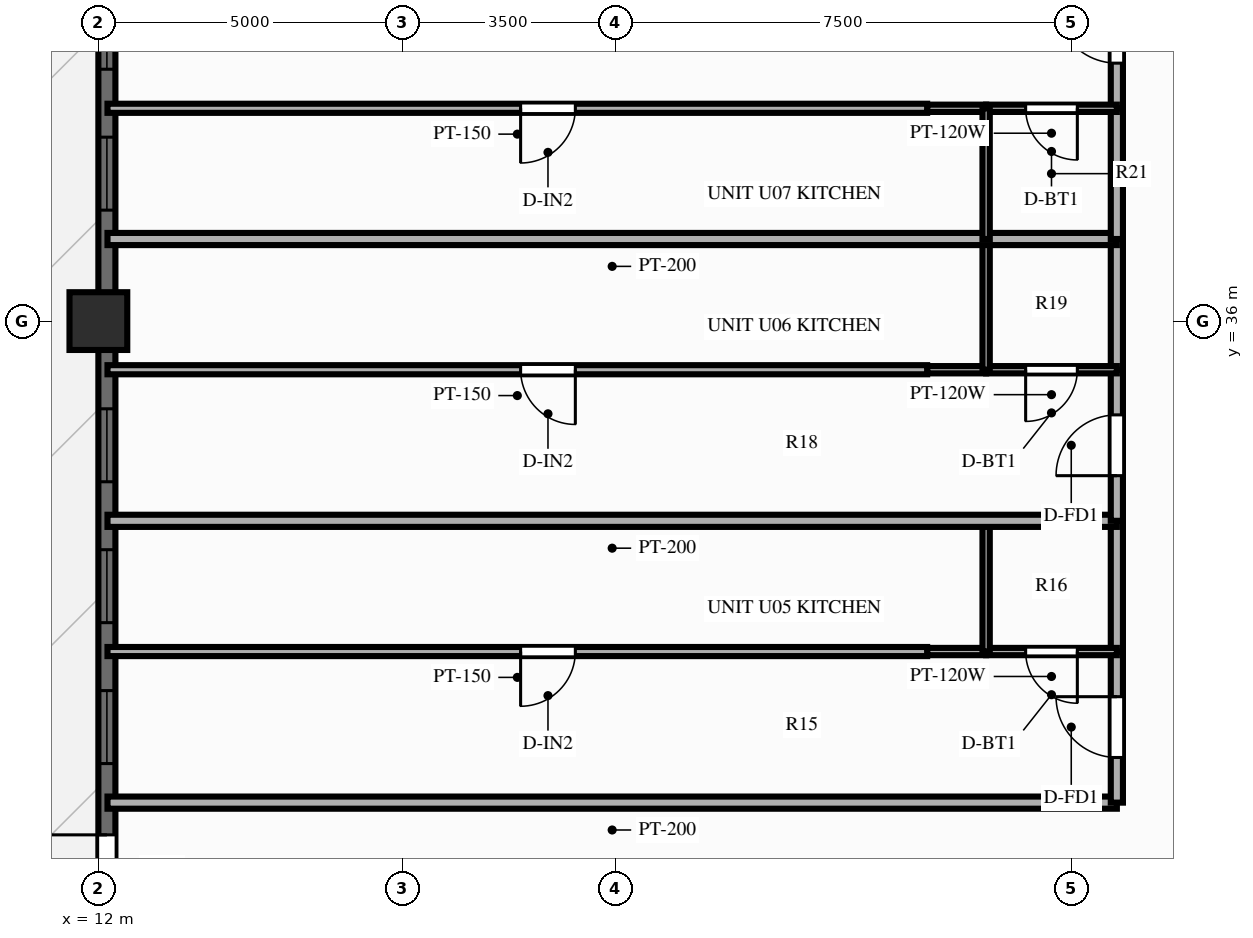
"""IFC4 building model, lengths in metres.
Left out: names, types, materials, properties, quantities, classifications, styles, units other than length and angle.
Written with IfcOpenShell. Run it as: python <this file> out.ifc"""

import sys

from ifc_helpers import new_model, si_unit, direction, frame, frame_2d, origin, origin_2d, place, context, subcontext, project, spatial, rectangle, extrude, source, transform, mapped, element, fill, save


model = new_model("IFC4")
c1 = context("Model", 3, precision=1e-05, world=origin(), true_north=direction((0.0, 1.0)))
c2 = subcontext(c1, "Body", "Model", "MODEL_VIEW")
j1 = project(units=[si_unit("LENGTHUNIT", "METRE"), si_unit("PLANEANGLEUNIT", "RADIAN")], contexts=[c1])
p1 = place(None, origin())
s1 = spatial("IfcSite", under=j1, at=p1, CompositionType="ELEMENT")
p2 = place(p1, origin())
s2 = spatial("IfcBuilding", under=s1, at=p2, CompositionType="ELEMENT")
p3 = place(p2, frame((0.0, 0.0, 122.85)))
s3 = spatial("IfcBuildingStorey", under=s2, at=p3, CompositionType="ELEMENT", Elevation=122.85)
m1 = source(origin(), c2, "Body", "SweptSolid", [
    extrude(rectangle(XDim=0.95, YDim=0.95, at=origin_2d()), origin(), (0.0, 0.0, 1.0), 3.9),
])
p4 = place(p3, frame((12.0, 36.0, 0.0), z_axis=(0.0, 0.0, 1.0), x_axis=(1.0, 0.0, 0.0)))
e1 = element("IfcColumn", 1, at=p4, inside=s3, PredefinedType="COLUMN", context=c2, shape_type="MappedRepresentation", body=[
    mapped(m1, transform((0.0, 0.0, 0.0), scale=1.0)),
])
p5 = place(p3, frame((12.14, 7.2, 0.0), z_axis=(0.0, 0.0, 1.0), x_axis=(0.0, 1.0, 0.0)))
e2 = element("IfcWall", 2, at=p5, inside=s3, PredefinedType="SOLIDWALL", context=c2, shape_type="SweptSolid", body=[
    extrude(rectangle(XDim=39.6, YDim=0.28, at=frame_2d((19.8, 0.0))), origin(), (0.0, 0.0, 1.0), 2.24),
])
p6 = place(p5, frame((0.89, 0.0, 0.25)))
e3 = element("IfcOpeningElement", 3, at=p6, cuts=e2, PredefinedType="OPENING", context=c2, shape_type="SweptSolid", body=[
    extrude(rectangle(XDim=1.2, YDim=1.5, at=frame_2d((0.6, 0.75))), frame((0.0, 0.152, 0.0), z_axis=(0.0, -1.0, 0.0), x_axis=(1.0, 0.0, 0.0)), (0.0, 0.0, 1.0), 0.304),
])
p7 = place(p5, frame((3.14, 0.0, 0.25)))
e4 = element("IfcOpeningElement", 4, at=p7, cuts=e2, PredefinedType="OPENING", context=c2, shape_type="SweptSolid", body=[
    extrude(rectangle(XDim=1.2, YDim=1.5, at=frame_2d((0.6, 0.75))), frame((0.0, 0.152, 0.0), z_axis=(0.0, -1.0, 0.0), x_axis=(1.0, 0.0, 0.0)), (0.0, 0.0, 1.0), 0.304),
])
p8 = place(p5, frame((5.458, 0.0, 0.25)))
e5 = element("IfcOpeningElement", 5, at=p8, cuts=e2, PredefinedType="OPENING", context=c2, shape_type="SweptSolid", body=[
    extrude(rectangle(XDim=1.2, YDim=1.5, at=frame_2d((0.6, 0.75))), frame((0.0, 0.152, 0.0), z_axis=(0.0, -1.0, 0.0), x_axis=(1.0, 0.0, 0.0)), (0.0, 0.0, 1.0), 0.304),
])
p9 = place(p5, frame((7.775, 0.0, 0.25)))
e6 = element("IfcOpeningElement", 6, at=p9, cuts=e2, PredefinedType="OPENING", context=c2, shape_type="SweptSolid", body=[
    extrude(rectangle(XDim=1.2, YDim=1.5, at=frame_2d((0.6, 0.75))), frame((0.0, 0.152, 0.0), z_axis=(0.0, -1.0, 0.0), x_axis=(1.0, 0.0, 0.0)), (0.0, 0.0, 1.0), 0.304),
])
p10 = place(p5, frame((12.242, 0.0, 0.25)))
e7 = element("IfcOpeningElement", 7, at=p10, cuts=e2, PredefinedType="OPENING", context=c2, shape_type="SweptSolid", body=[
    extrude(rectangle(XDim=1.2, YDim=1.5, at=frame_2d((0.6, 0.75))), frame((0.0, 0.152, 0.0), z_axis=(0.0, -1.0, 0.0), x_axis=(1.0, 0.0, 0.0)), (0.0, 0.0, 1.0), 0.304),
])
p11 = place(p5, frame((14.56, 0.0, 0.25)))
e8 = element("IfcOpeningElement", 8, at=p11, cuts=e2, PredefinedType="OPENING", context=c2, shape_type="SweptSolid", body=[
    extrude(rectangle(XDim=1.2, YDim=1.5, at=frame_2d((0.6, 0.75))), frame((0.0, 0.152, 0.0), z_axis=(0.0, -1.0, 0.0), x_axis=(1.0, 0.0, 0.0)), (0.0, 0.0, 1.0), 0.304),
])
p12 = place(p5, frame((16.877, 0.0, 0.25)))
e9 = element("IfcOpeningElement", 9, at=p12, cuts=e2, PredefinedType="OPENING", context=c2, shape_type="SweptSolid", body=[
    extrude(rectangle(XDim=1.2, YDim=1.5, at=frame_2d((0.6, 0.75))), frame((0.0, 0.152, 0.0), z_axis=(0.0, -1.0, 0.0), x_axis=(1.0, 0.0, 0.0)), (0.0, 0.0, 1.0), 0.304),
])
p13 = place(p5, frame((19.25, 0.0, 0.0)))
e10 = element("IfcOpeningElement", 10, at=p13, cuts=e2, PredefinedType="OPENING", context=c2, shape_type="SweptSolid", body=[
    extrude(rectangle(XDim=1.1, YDim=2.15, at=frame_2d((0.55, 1.075))), frame((0.0, 0.152, 0.0), z_axis=(0.0, -1.0, 0.0), x_axis=(1.0, 0.0, 0.0)), (0.0, 0.0, 1.0), 0.304),
])
p14 = place(p5, frame((21.522, 0.0, 0.25)))
e11 = element("IfcOpeningElement", 11, at=p14, cuts=e2, PredefinedType="OPENING", context=c2, shape_type="SweptSolid", body=[
    extrude(rectangle(XDim=1.2, YDim=1.5, at=frame_2d((0.6, 0.75))), frame((0.0, 0.152, 0.0), z_axis=(0.0, -1.0, 0.0), x_axis=(1.0, 0.0, 0.0)), (0.0, 0.0, 1.0), 0.304),
])
p15 = place(p5, frame((23.84, 0.0, 0.25)))
e12 = element("IfcOpeningElement", 12, at=p15, cuts=e2, PredefinedType="OPENING", context=c2, shape_type="SweptSolid", body=[
    extrude(rectangle(XDim=1.2, YDim=1.5, at=frame_2d((0.6, 0.75))), frame((0.0, 0.152, 0.0), z_axis=(0.0, -1.0, 0.0), x_axis=(1.0, 0.0, 0.0)), (0.0, 0.0, 1.0), 0.304),
])
p16 = place(p5, frame((26.157, 0.0, 0.25)))
e13 = element("IfcOpeningElement", 13, at=p16, cuts=e2, PredefinedType="OPENING", context=c2, shape_type="SweptSolid", body=[
    extrude(rectangle(XDim=1.2, YDim=1.5, at=frame_2d((0.6, 0.75))), frame((0.0, 0.152, 0.0), z_axis=(0.0, -1.0, 0.0), x_axis=(1.0, 0.0, 0.0)), (0.0, 0.0, 1.0), 0.304),
])
p17 = place(p5, frame((30.625, 0.0, 0.25)))
e14 = element("IfcOpeningElement", 14, at=p17, cuts=e2, PredefinedType="OPENING", context=c2, shape_type="SweptSolid", body=[
    extrude(rectangle(XDim=1.2, YDim=1.5, at=frame_2d((0.6, 0.75))), frame((0.0, 0.152, 0.0), z_axis=(0.0, -1.0, 0.0), x_axis=(1.0, 0.0, 0.0)), (0.0, 0.0, 1.0), 0.304),
])
p18 = place(p5, frame((32.942, 0.0, 0.25)))
e15 = element("IfcOpeningElement", 15, at=p18, cuts=e2, PredefinedType="OPENING", context=c2, shape_type="SweptSolid", body=[
    extrude(rectangle(XDim=1.2, YDim=1.5, at=frame_2d((0.6, 0.75))), frame((0.0, 0.152, 0.0), z_axis=(0.0, -1.0, 0.0), x_axis=(1.0, 0.0, 0.0)), (0.0, 0.0, 1.0), 0.304),
])
p19 = place(p5, frame((35.26, 0.0, 0.25)))
e16 = element("IfcOpeningElement", 16, at=p19, cuts=e2, PredefinedType="OPENING", context=c2, shape_type="SweptSolid", body=[
    extrude(rectangle(XDim=1.2, YDim=1.5, at=frame_2d((0.6, 0.75))), frame((0.0, 0.152, 0.0), z_axis=(0.0, -1.0, 0.0), x_axis=(1.0, 0.0, 0.0)), (0.0, 0.0, 1.0), 0.304),
])
p20 = place(p5, frame((37.51, 0.0, 0.25)))
e17 = element("IfcOpeningElement", 17, at=p20, cuts=e2, PredefinedType="OPENING", context=c2, shape_type="SweptSolid", body=[
    extrude(rectangle(XDim=1.2, YDim=1.5, at=frame_2d((0.6, 0.75))), frame((0.0, 0.152, 0.0), z_axis=(0.0, -1.0, 0.0), x_axis=(1.0, 0.0, 0.0)), (0.0, 0.0, 1.0), 0.304),
])
p21 = place(p3, frame((28.75, 28.08, 0.0), z_axis=(0.0, 0.0, 1.0), x_axis=(-1.0, 0.0, 0.0)))
e18 = element("IfcWall", 18, at=p21, inside=s3, PredefinedType="PARTITIONING", context=c2, shape_type="SweptSolid", body=[
    extrude(rectangle(XDim=16.6, YDim=0.2, at=frame_2d((8.3, 0.0))), origin(), (0.0, 0.0, 1.0), 3.56),
])
p22 = place(p3, frame((28.75, 28.08, 0.0), z_axis=(0.0, 0.0, 1.0), x_axis=(0.0, 1.0, 0.0)))
e19 = element("IfcWall", 19, at=p22, inside=s3, PredefinedType="PARTITIONING", context=c2, shape_type="SweptSolid", body=[
    extrude(rectangle(XDim=2.485, YDim=0.2, at=frame_2d((1.242, 0.0))), origin(), (0.0, 0.0, 1.0), 3.56),
])
p23 = place(p22, frame((0.742, 0.0, 0.0)))
e20 = element("IfcOpeningElement", 20, at=p23, cuts=e19, PredefinedType="OPENING", context=c2, shape_type="SweptSolid", body=[
    extrude(rectangle(XDim=1.0, YDim=2.15, at=frame_2d((0.5, 1.075))), frame((0.0, 0.112, 0.0), z_axis=(0.0, -1.0, 0.0), x_axis=(1.0, 0.0, 0.0)), (0.0, 0.0, 1.0), 0.224),
])
p24 = place(p3, frame((28.75, 30.565, 0.0), z_axis=(0.0, 0.0, 1.0), x_axis=(0.0, 1.0, 0.0)))
e21 = element("IfcWall", 21, at=p24, inside=s3, PredefinedType="PARTITIONING", context=c2, shape_type="SweptSolid", body=[
    extrude(rectangle(XDim=2.15, YDim=0.2, at=frame_2d((1.075, 0.0))), origin(), (0.0, 0.0, 1.0), 3.56),
])
p25 = place(p3, frame((28.75, 30.565, 0.0), z_axis=(0.0, 0.0, 1.0), x_axis=(-1.0, 0.0, 0.0)))
e22 = element("IfcWall", 22, at=p25, inside=s3, PredefinedType="PARTITIONING", context=c2, shape_type="SweptSolid", body=[
    extrude(rectangle(XDim=2.15, YDim=0.12, at=frame_2d((1.075, 0.0))), origin(), (0.0, 0.0, 1.0), 3.56),
])
p26 = place(p25, frame((0.65, 0.0, 0.0)))
e23 = element("IfcOpeningElement", 23, at=p26, cuts=e22, PredefinedType="OPENING", context=c2, shape_type="SweptSolid", body=[
    extrude(rectangle(XDim=0.85, YDim=2.05, at=frame_2d((0.425, 1.025))), frame((0.0, 0.072, 0.0), z_axis=(0.0, -1.0, 0.0), x_axis=(1.0, 0.0, 0.0)), (0.0, 0.0, 1.0), 0.144),
])
p27 = place(p3, frame((26.6, 30.565, 0.0), z_axis=(0.0, 0.0, 1.0), x_axis=(-1.0, 0.0, 0.0)))
e24 = element("IfcWall", 24, at=p27, inside=s3, PredefinedType="PARTITIONING", context=c2, shape_type="SweptSolid", body=[
    extrude(rectangle(XDim=0.97, YDim=0.12, at=frame_2d((0.485, 0.0))), origin(), (0.0, 0.0, 1.0), 3.56),
])
p28 = place(p3, frame((26.6, 30.565, 0.0), z_axis=(0.0, 0.0, 1.0), x_axis=(0.0, 1.0, 0.0)))
e25 = element("IfcWall", 25, at=p28, inside=s3, PredefinedType="PARTITIONING", context=c2, shape_type="SweptSolid", body=[
    extrude(rectangle(XDim=2.15, YDim=0.12, at=frame_2d((1.075, 0.0))), origin(), (0.0, 0.0, 1.0), 3.56),
])
p29 = place(p3, frame((25.63, 30.565, 0.0), z_axis=(0.0, 0.0, 1.0), x_axis=(-1.0, 0.0, 0.0)))
e26 = element("IfcWall", 26, at=p29, inside=s3, PredefinedType="PARTITIONING", context=c2, shape_type="SweptSolid", body=[
    extrude(rectangle(XDim=13.48, YDim=0.15, at=frame_2d((6.74, 0.0))), origin(), (0.0, 0.0, 1.0), 3.56),
])
p30 = place(p29, frame((5.786, 0.0, 0.0)))
e27 = element("IfcOpeningElement", 27, at=p30, cuts=e26, PredefinedType="OPENING", context=c2, shape_type="SweptSolid", body=[
    extrude(rectangle(XDim=0.9, YDim=2.1, at=frame_2d((0.45, 1.05))), frame((0.0, 0.087, 0.0), z_axis=(0.0, -1.0, 0.0), x_axis=(1.0, 0.0, 0.0)), (0.0, 0.0, 1.0), 0.174),
])
p31 = place(p3, frame((28.75, 32.715, 0.0), z_axis=(0.0, 0.0, 1.0), x_axis=(-1.0, 0.0, 0.0)))
e28 = element("IfcWall", 28, at=p31, inside=s3, PredefinedType="PARTITIONING", context=c2, shape_type="SweptSolid", body=[
    extrude(rectangle(XDim=16.6, YDim=0.2, at=frame_2d((8.3, 0.0))), origin(), (0.0, 0.0, 1.0), 3.56),
])
p32 = place(p3, frame((28.75, 32.715, 0.0), z_axis=(0.0, 0.0, 1.0), x_axis=(0.0, 1.0, 0.0)))
e29 = element("IfcWall", 29, at=p32, inside=s3, PredefinedType="PARTITIONING", context=c2, shape_type="SweptSolid", body=[
    extrude(rectangle(XDim=2.485, YDim=0.2, at=frame_2d((1.242, 0.0))), origin(), (0.0, 0.0, 1.0), 3.56),
])
p33 = place(p32, frame((0.742, 0.0, 0.0)))
e30 = element("IfcOpeningElement", 30, at=p33, cuts=e29, PredefinedType="OPENING", context=c2, shape_type="SweptSolid", body=[
    extrude(rectangle(XDim=1.0, YDim=2.15, at=frame_2d((0.5, 1.075))), frame((0.0, 0.112, 0.0), z_axis=(0.0, -1.0, 0.0), x_axis=(1.0, 0.0, 0.0)), (0.0, 0.0, 1.0), 0.224),
])
p34 = place(p3, frame((28.75, 35.2, 0.0), z_axis=(0.0, 0.0, 1.0), x_axis=(0.0, 1.0, 0.0)))
e31 = element("IfcWall", 31, at=p34, inside=s3, PredefinedType="PARTITIONING", context=c2, shape_type="SweptSolid", body=[
    extrude(rectangle(XDim=2.15, YDim=0.2, at=frame_2d((1.075, 0.0))), origin(), (0.0, 0.0, 1.0), 3.56),
])
p35 = place(p3, frame((28.75, 35.2, 0.0), z_axis=(0.0, 0.0, 1.0), x_axis=(-1.0, 0.0, 0.0)))
e32 = element("IfcWall", 32, at=p35, inside=s3, PredefinedType="PARTITIONING", context=c2, shape_type="SweptSolid", body=[
    extrude(rectangle(XDim=2.15, YDim=0.12, at=frame_2d((1.075, 0.0))), origin(), (0.0, 0.0, 1.0), 3.56),
])
p36 = place(p35, frame((0.65, 0.0, 0.0)))
e33 = element("IfcOpeningElement", 33, at=p36, cuts=e32, PredefinedType="OPENING", context=c2, shape_type="SweptSolid", body=[
    extrude(rectangle(XDim=0.85, YDim=2.05, at=frame_2d((0.425, 1.025))), frame((0.0, 0.072, 0.0), z_axis=(0.0, -1.0, 0.0), x_axis=(1.0, 0.0, 0.0)), (0.0, 0.0, 1.0), 0.144),
])
p37 = place(p3, frame((26.6, 35.2, 0.0), z_axis=(0.0, 0.0, 1.0), x_axis=(-1.0, 0.0, 0.0)))
e34 = element("IfcWall", 34, at=p37, inside=s3, PredefinedType="PARTITIONING", context=c2, shape_type="SweptSolid", body=[
    extrude(rectangle(XDim=0.97, YDim=0.12, at=frame_2d((0.485, 0.0))), origin(), (0.0, 0.0, 1.0), 3.56),
])
p38 = place(p3, frame((26.6, 35.2, 0.0), z_axis=(0.0, 0.0, 1.0), x_axis=(0.0, 1.0, 0.0)))
e35 = element("IfcWall", 35, at=p38, inside=s3, PredefinedType="PARTITIONING", context=c2, shape_type="SweptSolid", body=[
    extrude(rectangle(XDim=2.15, YDim=0.12, at=frame_2d((1.075, 0.0))), origin(), (0.0, 0.0, 1.0), 3.56),
])
p39 = place(p3, frame((25.63, 35.2, 0.0), z_axis=(0.0, 0.0, 1.0), x_axis=(-1.0, 0.0, 0.0)))
e36 = element("IfcWall", 36, at=p39, inside=s3, PredefinedType="PARTITIONING", context=c2, shape_type="SweptSolid", body=[
    extrude(rectangle(XDim=13.48, YDim=0.15, at=frame_2d((6.74, 0.0))), origin(), (0.0, 0.0, 1.0), 3.56),
])
p40 = place(p39, frame((5.786, 0.0, 0.0)))
e37 = element("IfcOpeningElement", 37, at=p40, cuts=e36, PredefinedType="OPENING", context=c2, shape_type="SweptSolid", body=[
    extrude(rectangle(XDim=0.9, YDim=2.1, at=frame_2d((0.45, 1.05))), frame((0.0, 0.087, 0.0), z_axis=(0.0, -1.0, 0.0), x_axis=(1.0, 0.0, 0.0)), (0.0, 0.0, 1.0), 0.174),
])
p41 = place(p3, frame((28.75, 37.35, 0.0), z_axis=(0.0, 0.0, 1.0), x_axis=(-1.0, 0.0, 0.0)))
e38 = element("IfcWall", 38, at=p41, inside=s3, PredefinedType="PARTITIONING", context=c2, shape_type="SweptSolid", body=[
    extrude(rectangle(XDim=16.6, YDim=0.2, at=frame_2d((8.3, 0.0))), origin(), (0.0, 0.0, 1.0), 3.56),
])
p42 = place(p3, frame((28.75, 37.35, 0.0), z_axis=(0.0, 0.0, 1.0), x_axis=(0.0, 1.0, 0.0)))
e39 = element("IfcWall", 39, at=p42, inside=s3, PredefinedType="PARTITIONING", context=c2, shape_type="SweptSolid", body=[
    extrude(rectangle(XDim=2.15, YDim=0.2, at=frame_2d((1.075, 0.0))), origin(), (0.0, 0.0, 1.0), 3.56),
])
p43 = place(p3, frame((28.75, 39.5, 0.0), z_axis=(0.0, 0.0, 1.0), x_axis=(0.0, 1.0, 0.0)))
e40 = element("IfcWall", 40, at=p43, inside=s3, PredefinedType="PARTITIONING", context=c2, shape_type="SweptSolid", body=[
    extrude(rectangle(XDim=2.485, YDim=0.2, at=frame_2d((1.243, 0.0))), origin(), (0.0, 0.0, 1.0), 3.56),
])
p44 = place(p43, frame((0.742, 0.0, 0.0)))
e41 = element("IfcOpeningElement", 41, at=p44, cuts=e40, PredefinedType="OPENING", context=c2, shape_type="SweptSolid", body=[
    extrude(rectangle(XDim=1.0, YDim=2.15, at=frame_2d((0.5, 1.075))), frame((0.0, 0.112, 0.0), z_axis=(0.0, -1.0, 0.0), x_axis=(1.0, 0.0, 0.0)), (0.0, 0.0, 1.0), 0.224),
])
p45 = place(p3, frame((28.75, 39.5, 0.0), z_axis=(0.0, 0.0, 1.0), x_axis=(-1.0, 0.0, 0.0)))
e42 = element("IfcWall", 42, at=p45, inside=s3, PredefinedType="PARTITIONING", context=c2, shape_type="SweptSolid", body=[
    extrude(rectangle(XDim=2.15, YDim=0.12, at=frame_2d((1.075, 0.0))), origin(), (0.0, 0.0, 1.0), 3.56),
])
p46 = place(p45, frame((0.65, 0.0, 0.0)))
e43 = element("IfcOpeningElement", 43, at=p46, cuts=e42, PredefinedType="OPENING", context=c2, shape_type="SweptSolid", body=[
    extrude(rectangle(XDim=0.85, YDim=2.05, at=frame_2d((0.425, 1.025))), frame((0.0, 0.072, 0.0), z_axis=(0.0, -1.0, 0.0), x_axis=(1.0, 0.0, 0.0)), (0.0, 0.0, 1.0), 0.144),
])
p47 = place(p3, frame((26.6, 39.5, 0.0), z_axis=(0.0, 0.0, 1.0), x_axis=(-1.0, 0.0, 0.0)))
e44 = element("IfcWall", 44, at=p47, inside=s3, PredefinedType="PARTITIONING", context=c2, shape_type="SweptSolid", body=[
    extrude(rectangle(XDim=0.97, YDim=0.12, at=frame_2d((0.485, 0.0))), origin(), (0.0, 0.0, 1.0), 3.56),
])
p48 = place(p3, frame((26.6, 37.35, 0.0), z_axis=(0.0, 0.0, 1.0), x_axis=(0.0, 1.0, 0.0)))
e45 = element("IfcWall", 45, at=p48, inside=s3, PredefinedType="PARTITIONING", context=c2, shape_type="SweptSolid", body=[
    extrude(rectangle(XDim=2.15, YDim=0.12, at=frame_2d((1.075, 0.0))), origin(), (0.0, 0.0, 1.0), 3.56),
])
p49 = place(p3, frame((25.63, 39.5, 0.0), z_axis=(0.0, 0.0, 1.0), x_axis=(-1.0, 0.0, 0.0)))
e46 = element("IfcWall", 46, at=p49, inside=s3, PredefinedType="PARTITIONING", context=c2, shape_type="SweptSolid", body=[
    extrude(rectangle(XDim=13.48, YDim=0.15, at=frame_2d((6.74, 0.0))), origin(), (0.0, 0.0, 1.0), 3.56),
])
p50 = place(p49, frame((5.786, 0.0, 0.0)))
e47 = element("IfcOpeningElement", 47, at=p50, cuts=e46, PredefinedType="OPENING", context=c2, shape_type="SweptSolid", body=[
    extrude(rectangle(XDim=0.9, YDim=2.1, at=frame_2d((0.45, 1.05))), frame((0.0, 0.087, 0.0), z_axis=(0.0, -1.0, 0.0), x_axis=(1.0, 0.0, 0.0)), (0.0, 0.0, 1.0), 0.174),
])
m2 = source(origin(), c2, "Body", "SweptSolid", [
    extrude(rectangle(XDim=1.1, YDim=2.15, at=frame_2d((0.55, 1.075))), frame((0.0, 0.025, 0.0), z_axis=(0.0, -1.0, 0.0), x_axis=(1.0, 0.0, 0.0)), (0.0, 0.0, 1.0), 0.05),
])
p51 = place(p13, origin())
e48 = element("IfcDoor", 48, at=p51, inside=s3, OperationType="SINGLE_SWING_RIGHT", PredefinedType="DOOR", context=c2, shape_type="MappedRepresentation", body=[
    mapped(m2, transform((0.0, 0.0, 0.0), scale=1.0)),
])
fill(e10, e48)
m3 = source(origin(), c2, "Body", "SweptSolid", [
    extrude(rectangle(XDim=1.2, YDim=1.5, at=frame_2d((0.6, 0.75))), frame((0.0, 0.03, 0.0), z_axis=(0.0, -1.0, 0.0), x_axis=(1.0, 0.0, 0.0)), (0.0, 0.0, 1.0), 0.06),
])
p52 = place(p14, origin())
e49 = element("IfcWindow", 49, at=p52, inside=s3, PartitioningType="SINGLE_PANEL", PredefinedType="WINDOW", context=c2, shape_type="MappedRepresentation", body=[
    mapped(m3, transform((0.0, 0.0, 0.0), scale=1.0)),
])
fill(e11, e49)
p53 = place(p15, origin())
e50 = element("IfcWindow", 50, at=p53, inside=s3, PartitioningType="SINGLE_PANEL", PredefinedType="WINDOW", context=c2, shape_type="MappedRepresentation", body=[
    mapped(m3, transform((0.0, 0.0, 0.0), scale=1.0)),
])
fill(e12, e50)
p54 = place(p16, origin())
e51 = element("IfcWindow", 51, at=p54, inside=s3, PartitioningType="SINGLE_PANEL", PredefinedType="WINDOW", context=c2, shape_type="MappedRepresentation", body=[
    mapped(m3, transform((0.0, 0.0, 0.0), scale=1.0)),
])
fill(e13, e51)
p55 = place(p17, origin())
e52 = element("IfcWindow", 52, at=p55, inside=s3, PartitioningType="SINGLE_PANEL", PredefinedType="WINDOW", context=c2, shape_type="MappedRepresentation", body=[
    mapped(m3, transform((0.0, 0.0, 0.0), scale=1.0)),
])
fill(e14, e52)
p56 = place(p18, origin())
e53 = element("IfcWindow", 53, at=p56, inside=s3, PartitioningType="SINGLE_PANEL", PredefinedType="WINDOW", context=c2, shape_type="MappedRepresentation", body=[
    mapped(m3, transform((0.0, 0.0, 0.0), scale=1.0)),
])
fill(e15, e53)
m4 = source(origin(), c2, "Body", "SweptSolid", [
    extrude(rectangle(XDim=1.0, YDim=2.15, at=frame_2d((0.5, 1.075))), frame((0.0, 0.025, 0.0), z_axis=(0.0, -1.0, 0.0), x_axis=(1.0, 0.0, 0.0)), (0.0, 0.0, 1.0), 0.05),
])
p57 = place(p23, origin())
e54 = element("IfcDoor", 54, at=p57, inside=s3, OperationType="SINGLE_SWING_RIGHT", PredefinedType="DOOR", context=c2, shape_type="MappedRepresentation", body=[
    mapped(m4, transform((0.0, 0.0, 0.0), scale=1.0)),
])
fill(e20, e54)
m5 = source(origin(), c2, "Body", "SweptSolid", [
    extrude(rectangle(XDim=0.85, YDim=2.05, at=frame_2d((0.425, 1.025))), frame((0.0, 0.025, 0.0), z_axis=(0.0, -1.0, 0.0), x_axis=(1.0, 0.0, 0.0)), (0.0, 0.0, 1.0), 0.05),
])
p58 = place(p26, origin())
e55 = element("IfcDoor", 55, at=p58, inside=s3, OperationType="SINGLE_SWING_LEFT", PredefinedType="DOOR", context=c2, shape_type="MappedRepresentation", body=[
    mapped(m5, transform((0.0, 0.0, 0.0), scale=1.0)),
])
fill(e23, e55)
m6 = source(origin(), c2, "Body", "SweptSolid", [
    extrude(rectangle(XDim=0.9, YDim=2.1, at=frame_2d((0.45, 1.05))), frame((0.0, 0.025, 0.0), z_axis=(0.0, -1.0, 0.0), x_axis=(1.0, 0.0, 0.0)), (0.0, 0.0, 1.0), 0.05),
])
p59 = place(p30, origin())
e56 = element("IfcDoor", 56, at=p59, inside=s3, OperationType="SINGLE_SWING_RIGHT", PredefinedType="DOOR", context=c2, shape_type="MappedRepresentation", body=[
    mapped(m6, transform((0.0, 0.0, 0.0), scale=1.0)),
])
fill(e27, e56)
p60 = place(p33, origin())
e57 = element("IfcDoor", 57, at=p60, inside=s3, OperationType="SINGLE_SWING_LEFT", PredefinedType="DOOR", context=c2, shape_type="MappedRepresentation", body=[
    mapped(m4, transform((0.0, 0.0, 0.0), scale=1.0)),
])
fill(e30, e57)
p61 = place(p36, origin())
e58 = element("IfcDoor", 58, at=p61, inside=s3, OperationType="SINGLE_SWING_RIGHT", PredefinedType="DOOR", context=c2, shape_type="MappedRepresentation", body=[
    mapped(m5, transform((0.0, 0.0, 0.0), scale=1.0)),
])
fill(e33, e58)
p62 = place(p40, origin())
e59 = element("IfcDoor", 59, at=p62, inside=s3, OperationType="SINGLE_SWING_LEFT", PredefinedType="DOOR", context=c2, shape_type="MappedRepresentation", body=[
    mapped(m6, transform((0.0, 0.0, 0.0), scale=1.0)),
])
fill(e37, e59)
p63 = place(p44, origin())
e60 = element("IfcDoor", 60, at=p63, inside=s3, OperationType="SINGLE_SWING_RIGHT", PredefinedType="DOOR", context=c2, shape_type="MappedRepresentation", body=[
    mapped(m4, transform((0.0, 0.0, 0.0), scale=1.0)),
])
fill(e41, e60)
p64 = place(p46, origin())
e61 = element("IfcDoor", 61, at=p64, inside=s3, OperationType="SINGLE_SWING_LEFT", PredefinedType="DOOR", context=c2, shape_type="MappedRepresentation", body=[
    mapped(m5, transform((0.0, 0.0, 0.0), scale=1.0)),
])
fill(e43, e61)
p65 = place(p50, origin())
e62 = element("IfcDoor", 62, at=p65, inside=s3, OperationType="SINGLE_SWING_RIGHT", PredefinedType="DOOR", context=c2, shape_type="MappedRepresentation", body=[
    mapped(m6, transform((0.0, 0.0, 0.0), scale=1.0)),
])
fill(e47, e62)
save(model, sys.argv[1])
